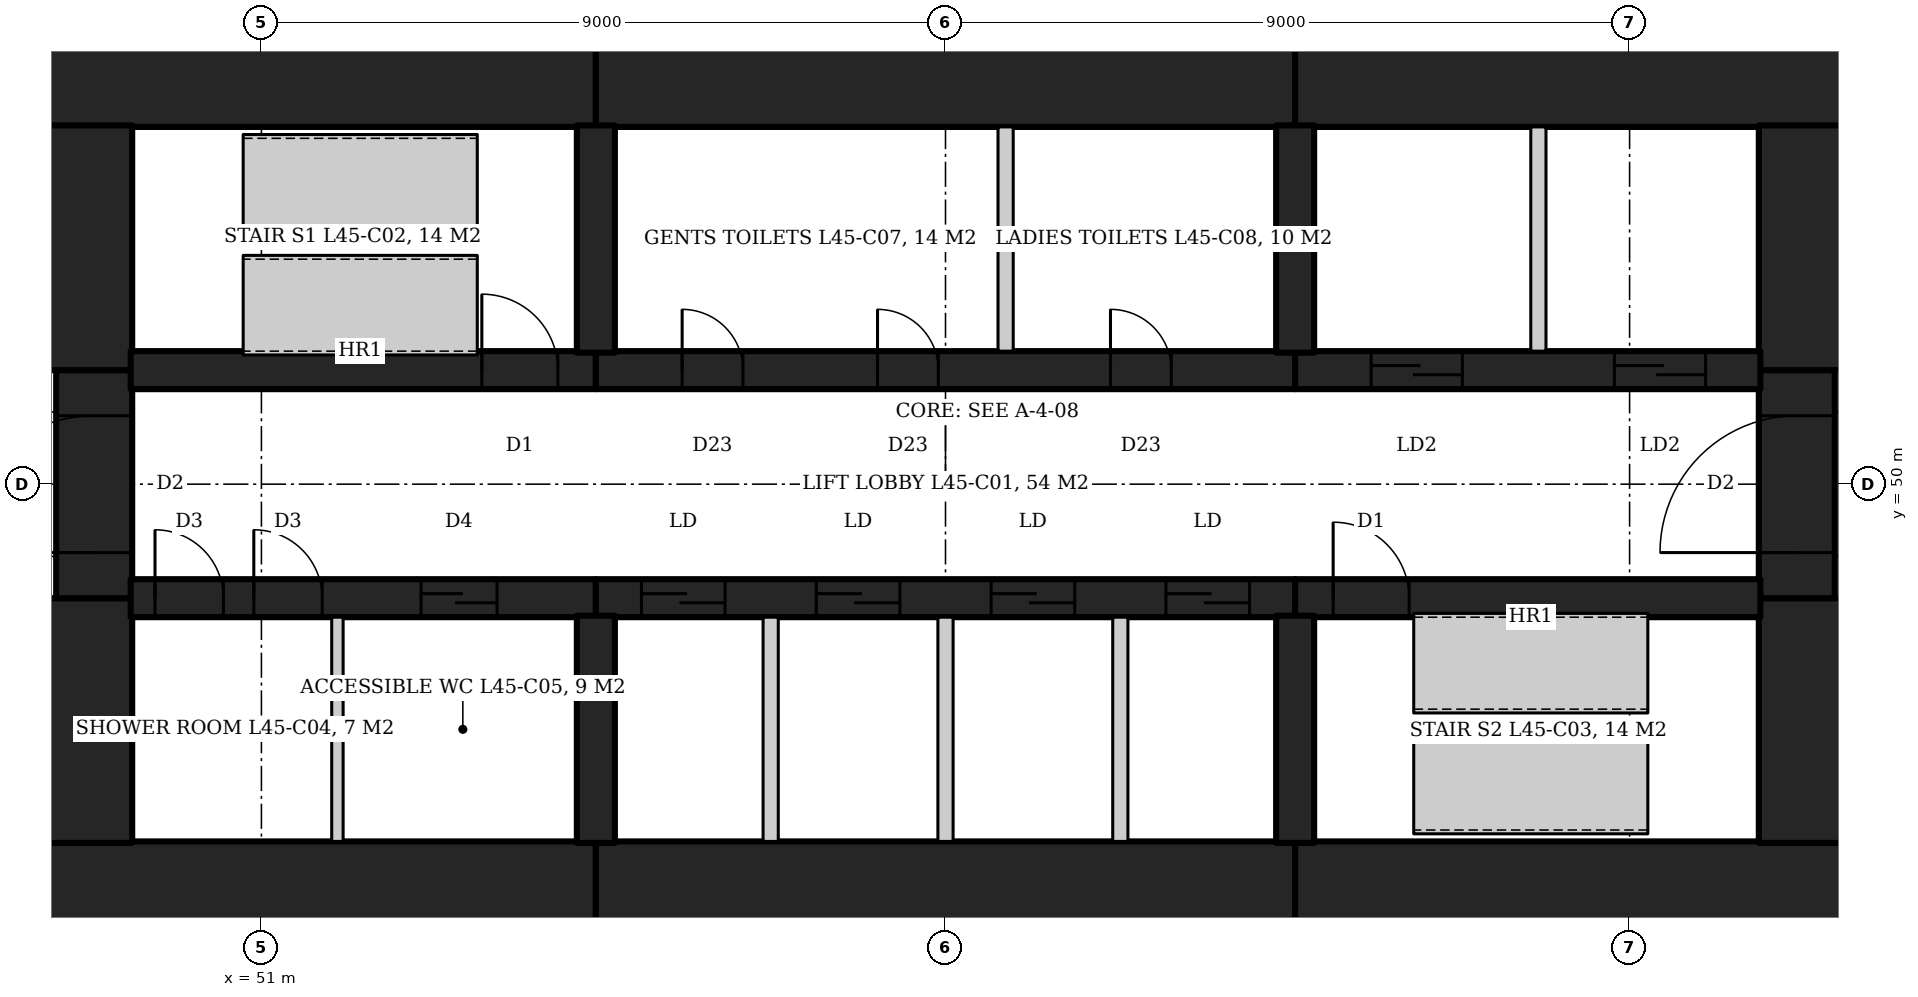
"""IFC4 building model, lengths in metres.
Left out: names, types, materials, properties, quantities, classifications, styles, units other than length and angle.
Written with IfcOpenShell. Run it as: python <this file> out.ifc"""

import sys

from ifc_helpers import new_model, si_unit, direction, frame, frame_2d, origin, place, context, subcontext, project, spatial, rectangle, extrude, element, fill, save


model = new_model("IFC4")
c1 = context("Model", 3, precision=1e-05, world=origin(), true_north=direction((0.0, 1.0)))
c2 = subcontext(c1, "Body", "Model", "MODEL_VIEW")
j1 = project(units=[si_unit("LENGTHUNIT", "METRE"), si_unit("PLANEANGLEUNIT", "RADIAN")], contexts=[c1])
p1 = place(None, origin())
s1 = spatial("IfcSite", under=j1, at=p1, CompositionType="ELEMENT")
p2 = place(p1, origin())
s2 = spatial("IfcBuilding", under=s1, at=p2, CompositionType="ELEMENT")
p3 = place(p2, frame((0.0, 0.0, 198.2)))
s3 = spatial("IfcBuildingStorey", under=s2, at=p3, CompositionType="ELEMENT", Elevation=198.2)
p4 = place(p3, frame((47.5, 55.45, 0.0), z_axis=(0.0, 0.0, 1.0), x_axis=(1.0, 0.0, 0.0)))
e1 = element("IfcWall", 1, at=p4, inside=s3, PredefinedType="SHEAR", context=c2, shape_type="SweptSolid", body=[
    extrude(rectangle(XDim=7.9, YDim=1.5, at=frame_2d((3.95, 0.0))), origin(), (0.0, 0.0, 1.0), 4.2),
])
p5 = place(p3, frame((55.4, 55.45, 0.0), z_axis=(0.0, 0.0, 1.0), x_axis=(1.0, 0.0, 0.0)))
e2 = element("IfcWall", 2, at=p5, inside=s3, PredefinedType="SHEAR", context=c2, shape_type="SweptSolid", body=[
    extrude(rectangle(XDim=9.2, YDim=1.5, at=frame_2d((4.6, 0.0))), origin(), (0.0, 0.0, 1.0), 4.2),
])
for number, where, z_axis, x_axis in (
    (3, (64.6, 55.45, 0.0), (0.0, 0.0, 1.0), (1.0, 0.0, 0.0)),
    (4, (47.5, 44.55, 0.0), (0.0, 0.0, 1.0), (1.0, 0.0, 0.0)),
):
    element("IfcWall", number, at=place(p3, frame(where, z_axis=z_axis, x_axis=x_axis)), inside=s3, PredefinedType="SHEAR", context=c2, shape_type="SweptSolid", body=[
        extrude(rectangle(XDim=7.9, YDim=1.5, at=frame_2d((3.95, 0.0))), origin(), (0.0, 0.0, 1.0), 4.2),
    ])
p6 = place(p3, frame((55.4, 44.55, 0.0), z_axis=(0.0, 0.0, 1.0), x_axis=(1.0, 0.0, 0.0)))
e5 = element("IfcWall", 5, at=p6, inside=s3, PredefinedType="SHEAR", context=c2, shape_type="SweptSolid", body=[
    extrude(rectangle(XDim=9.2, YDim=1.5, at=frame_2d((4.6, 0.0))), origin(), (0.0, 0.0, 1.0), 4.2),
])
p7 = place(p3, frame((64.6, 44.55, 0.0), z_axis=(0.0, 0.0, 1.0), x_axis=(1.0, 0.0, 0.0)))
e6 = element("IfcWall", 6, at=p7, inside=s3, PredefinedType="SHEAR", context=c2, shape_type="SweptSolid", body=[
    extrude(rectangle(XDim=7.9, YDim=1.5, at=frame_2d((3.95, 0.0))), origin(), (0.0, 0.0, 1.0), 4.2),
])
p8 = place(p3, frame((71.6, 45.28, 0.0), z_axis=(0.0, 0.0, 1.0), x_axis=(0.0, 1.0, 0.0)))
e7 = element("IfcWall", 7, at=p8, inside=s3, PredefinedType="SHEAR", context=c2, shape_type="SweptSolid", body=[
    extrude(rectangle(XDim=3.22, YDim=1.8, at=frame_2d((1.61, 0.0))), origin(), (0.0, 0.0, 1.0), 4.2),
])
p9 = place(p3, frame((71.2, 48.5, 0.0), z_axis=(0.0, 0.0, 1.0), x_axis=(0.0, 1.0, 0.0)))
e8 = element("IfcWall", 8, at=p9, inside=s3, PredefinedType="SHEAR", context=c2, shape_type="SweptSolid", body=[
    extrude(rectangle(XDim=3.0, YDim=1.0, at=frame_2d((1.5, 0.0))), origin(), (0.0, 0.0, 1.0), 4.2),
])
p10 = place(p9, frame((0.6, 0.0, 0.0)))
e9 = element("IfcOpeningElement", 9, at=p10, cuts=e8, PredefinedType="OPENING", context=c2, shape_type="SweptSolid", body=[
    extrude(rectangle(XDim=1.8, YDim=2.1, at=frame_2d((0.9, 1.05))), frame((0.0, 0.51, 0.0), z_axis=(0.0, -1.0, 0.0), x_axis=(1.0, 0.0, 0.0)), (0.0, 0.0, 1.0), 1.02),
])
for number, where, z_axis, x_axis in (
    (10, (71.6, 51.5, 0.0), (0.0, 0.0, 1.0), (0.0, 1.0, 0.0)),
    (11, (48.4, 45.28, 0.0), (0.0, 0.0, 1.0), (0.0, 1.0, 0.0)),
):
    element("IfcWall", number, at=place(p3, frame(where, z_axis=z_axis, x_axis=x_axis)), inside=s3, PredefinedType="SHEAR", context=c2, shape_type="SweptSolid", body=[
        extrude(rectangle(XDim=3.22, YDim=1.8, at=frame_2d((1.61, 0.0))), origin(), (0.0, 0.0, 1.0), 4.2),
    ])
p11 = place(p3, frame((48.8, 48.5, 0.0), z_axis=(0.0, 0.0, 1.0), x_axis=(0.0, 1.0, 0.0)))
e12 = element("IfcWall", 12, at=p11, inside=s3, PredefinedType="SHEAR", context=c2, shape_type="SweptSolid", body=[
    extrude(rectangle(XDim=3.0, YDim=1.0, at=frame_2d((1.5, 0.0))), origin(), (0.0, 0.0, 1.0), 4.2),
])
p12 = place(p11, frame((0.6, 0.0, 0.0)))
e13 = element("IfcOpeningElement", 13, at=p12, cuts=e12, PredefinedType="OPENING", context=c2, shape_type="SweptSolid", body=[
    extrude(rectangle(XDim=1.8, YDim=2.1, at=frame_2d((0.9, 1.05))), frame((0.0, 0.51, 0.0), z_axis=(0.0, -1.0, 0.0), x_axis=(1.0, 0.0, 0.0)), (0.0, 0.0, 1.0), 1.02),
])
p13 = place(p3, frame((48.4, 51.5, 0.0), z_axis=(0.0, 0.0, 1.0), x_axis=(0.0, 1.0, 0.0)))
e14 = element("IfcWall", 14, at=p13, inside=s3, PredefinedType="SHEAR", context=c2, shape_type="SweptSolid", body=[
    extrude(rectangle(XDim=3.22, YDim=1.8, at=frame_2d((1.61, 0.0))), origin(), (0.0, 0.0, 1.0), 4.2),
])
p14 = place(p3, frame((49.28, 51.5, 0.0), z_axis=(0.0, 0.0, 1.0), x_axis=(1.0, 0.0, 0.0)))
e15 = element("IfcWall", 15, at=p14, inside=s3, PredefinedType="SHEAR", context=c2, shape_type="SweptSolid", body=[
    extrude(rectangle(XDim=6.12, YDim=0.5, at=frame_2d((3.06, 0.0))), origin(), (0.0, 0.0, 1.0), 4.2),
])
p15 = place(p14, frame((4.62, 0.0, 0.0)))
e16 = element("IfcOpeningElement", 16, at=p15, cuts=e15, PredefinedType="OPENING", context=c2, shape_type="SweptSolid", body=[
    extrude(rectangle(XDim=1.0, YDim=2.1, at=frame_2d((0.5, 1.05))), frame((0.0, 0.26, 0.0), z_axis=(0.0, -1.0, 0.0), x_axis=(1.0, 0.0, 0.0)), (0.0, 0.0, 1.0), 0.52),
])
p16 = place(p3, frame((55.4, 51.5, 0.0), z_axis=(0.0, 0.0, 1.0), x_axis=(1.0, 0.0, 0.0)))
e17 = element("IfcWall", 17, at=p16, inside=s3, PredefinedType="SHEAR", context=c2, shape_type="SweptSolid", body=[
    extrude(rectangle(XDim=9.2, YDim=0.5, at=frame_2d((4.6, 0.0))), origin(), (0.0, 0.0, 1.0), 4.2),
])
p17 = place(p16, frame((1.135, 0.0, 0.0)))
e18 = element("IfcOpeningElement", 18, at=p17, cuts=e17, PredefinedType="OPENING", context=c2, shape_type="SweptSolid", body=[
    extrude(rectangle(XDim=0.8, YDim=2.1, at=frame_2d((0.4, 1.05))), frame((0.0, 0.26, 0.0), z_axis=(0.0, -1.0, 0.0), x_axis=(1.0, 0.0, 0.0)), (0.0, 0.0, 1.0), 0.52),
])
p18 = place(p16, frame((3.706, 0.0, 0.0)))
e19 = element("IfcOpeningElement", 19, at=p18, cuts=e17, PredefinedType="OPENING", context=c2, shape_type="SweptSolid", body=[
    extrude(rectangle(XDim=0.8, YDim=2.1, at=frame_2d((0.4, 1.05))), frame((0.0, 0.26, 0.0), z_axis=(0.0, -1.0, 0.0), x_axis=(1.0, 0.0, 0.0)), (0.0, 0.0, 1.0), 0.52),
])
p19 = place(p16, frame((6.771, 0.0, 0.0)))
e20 = element("IfcOpeningElement", 20, at=p19, cuts=e17, PredefinedType="OPENING", context=c2, shape_type="SweptSolid", body=[
    extrude(rectangle(XDim=0.8, YDim=2.1, at=frame_2d((0.4, 1.05))), frame((0.0, 0.26, 0.0), z_axis=(0.0, -1.0, 0.0), x_axis=(1.0, 0.0, 0.0)), (0.0, 0.0, 1.0), 0.52),
])
p20 = place(p3, frame((64.6, 51.5, 0.0), z_axis=(0.0, 0.0, 1.0), x_axis=(1.0, 0.0, 0.0)))
e21 = element("IfcWall", 21, at=p20, inside=s3, PredefinedType="SHEAR", context=c2, shape_type="SweptSolid", body=[
    extrude(rectangle(XDim=6.12, YDim=0.5, at=frame_2d((3.06, 0.0))), origin(), (0.0, 0.0, 1.0), 4.2),
])
p21 = place(p20, frame((1.0, 0.0, 0.0)))
e22 = element("IfcOpeningElement", 22, at=p21, cuts=e21, PredefinedType="OPENING", context=c2, shape_type="SweptSolid", body=[
    extrude(rectangle(XDim=1.2, YDim=2.1, at=frame_2d((0.6, 1.05))), frame((0.0, 0.26, 0.0), z_axis=(0.0, -1.0, 0.0), x_axis=(1.0, 0.0, 0.0)), (0.0, 0.0, 1.0), 0.52),
])
p22 = place(p20, frame((4.2, 0.0, 0.0)))
e23 = element("IfcOpeningElement", 23, at=p22, cuts=e21, PredefinedType="OPENING", context=c2, shape_type="SweptSolid", body=[
    extrude(rectangle(XDim=1.2, YDim=2.1, at=frame_2d((0.6, 1.05))), frame((0.0, 0.26, 0.0), z_axis=(0.0, -1.0, 0.0), x_axis=(1.0, 0.0, 0.0)), (0.0, 0.0, 1.0), 0.52),
])
p23 = place(p3, frame((49.28, 48.5, 0.0), z_axis=(0.0, 0.0, 1.0), x_axis=(1.0, 0.0, 0.0)))
e24 = element("IfcWall", 24, at=p23, inside=s3, PredefinedType="SHEAR", context=c2, shape_type="SweptSolid", body=[
    extrude(rectangle(XDim=6.12, YDim=0.5, at=frame_2d((3.06, 0.0))), origin(), (0.0, 0.0, 1.0), 4.2),
])
p24 = place(p23, frame((0.32, 0.0, 0.0)))
e25 = element("IfcOpeningElement", 25, at=p24, cuts=e24, PredefinedType="OPENING", context=c2, shape_type="SweptSolid", body=[
    extrude(rectangle(XDim=0.9, YDim=2.1, at=frame_2d((0.45, 1.05))), frame((0.0, 0.26, 0.0), z_axis=(0.0, -1.0, 0.0), x_axis=(1.0, 0.0, 0.0)), (0.0, 0.0, 1.0), 0.52),
])
p25 = place(p23, frame((1.62, 0.0, 0.0)))
e26 = element("IfcOpeningElement", 26, at=p25, cuts=e24, PredefinedType="OPENING", context=c2, shape_type="SweptSolid", body=[
    extrude(rectangle(XDim=0.9, YDim=2.1, at=frame_2d((0.45, 1.05))), frame((0.0, 0.26, 0.0), z_axis=(0.0, -1.0, 0.0), x_axis=(1.0, 0.0, 0.0)), (0.0, 0.0, 1.0), 0.52),
])
p26 = place(p23, frame((3.82, 0.0, 0.0)))
e27 = element("IfcOpeningElement", 27, at=p26, cuts=e24, PredefinedType="OPENING", context=c2, shape_type="SweptSolid", body=[
    extrude(rectangle(XDim=1.0, YDim=2.1, at=frame_2d((0.5, 1.05))), frame((0.0, 0.26, 0.0), z_axis=(0.0, -1.0, 0.0), x_axis=(1.0, 0.0, 0.0)), (0.0, 0.0, 1.0), 0.52),
])
p27 = place(p3, frame((55.4, 48.5, 0.0), z_axis=(0.0, 0.0, 1.0), x_axis=(1.0, 0.0, 0.0)))
e28 = element("IfcWall", 28, at=p27, inside=s3, PredefinedType="SHEAR", context=c2, shape_type="SweptSolid", body=[
    extrude(rectangle(XDim=9.2, YDim=0.5, at=frame_2d((4.6, 0.0))), origin(), (0.0, 0.0, 1.0), 4.2),
])
p28 = place(p27, frame((0.6, 0.0, 0.0)))
e29 = element("IfcOpeningElement", 29, at=p28, cuts=e28, PredefinedType="OPENING", context=c2, shape_type="SweptSolid", body=[
    extrude(rectangle(XDim=1.1, YDim=2.1, at=frame_2d((0.55, 1.05))), frame((0.0, 0.26, 0.0), z_axis=(0.0, -1.0, 0.0), x_axis=(1.0, 0.0, 0.0)), (0.0, 0.0, 1.0), 0.52),
])
p29 = place(p27, frame((2.9, 0.0, 0.0)))
e30 = element("IfcOpeningElement", 30, at=p29, cuts=e28, PredefinedType="OPENING", context=c2, shape_type="SweptSolid", body=[
    extrude(rectangle(XDim=1.1, YDim=2.1, at=frame_2d((0.55, 1.05))), frame((0.0, 0.26, 0.0), z_axis=(0.0, -1.0, 0.0), x_axis=(1.0, 0.0, 0.0)), (0.0, 0.0, 1.0), 0.52),
])
p30 = place(p27, frame((5.2, 0.0, 0.0)))
e31 = element("IfcOpeningElement", 31, at=p30, cuts=e28, PredefinedType="OPENING", context=c2, shape_type="SweptSolid", body=[
    extrude(rectangle(XDim=1.1, YDim=2.1, at=frame_2d((0.55, 1.05))), frame((0.0, 0.26, 0.0), z_axis=(0.0, -1.0, 0.0), x_axis=(1.0, 0.0, 0.0)), (0.0, 0.0, 1.0), 0.52),
])
p31 = place(p27, frame((7.5, 0.0, 0.0)))
e32 = element("IfcOpeningElement", 32, at=p31, cuts=e28, PredefinedType="OPENING", context=c2, shape_type="SweptSolid", body=[
    extrude(rectangle(XDim=1.1, YDim=2.1, at=frame_2d((0.55, 1.05))), frame((0.0, 0.26, 0.0), z_axis=(0.0, -1.0, 0.0), x_axis=(1.0, 0.0, 0.0)), (0.0, 0.0, 1.0), 0.52),
])
p32 = place(p3, frame((64.6, 48.5, 0.0), z_axis=(0.0, 0.0, 1.0), x_axis=(1.0, 0.0, 0.0)))
e33 = element("IfcWall", 33, at=p32, inside=s3, PredefinedType="SHEAR", context=c2, shape_type="SweptSolid", body=[
    extrude(rectangle(XDim=6.12, YDim=0.5, at=frame_2d((3.06, 0.0))), origin(), (0.0, 0.0, 1.0), 4.2),
])
p33 = place(p32, frame((0.5, 0.0, 0.0)))
e34 = element("IfcOpeningElement", 34, at=p33, cuts=e33, PredefinedType="OPENING", context=c2, shape_type="SweptSolid", body=[
    extrude(rectangle(XDim=1.0, YDim=2.1, at=frame_2d((0.5, 1.05))), frame((0.0, 0.26, 0.0), z_axis=(0.0, -1.0, 0.0), x_axis=(1.0, 0.0, 0.0)), (0.0, 0.0, 1.0), 0.52),
])
for number, where, z_axis, x_axis in (
    (35, (55.4, 51.73, 0.0), (0.0, 0.0, 1.0), (0.0, 1.0, 0.0)),
    (36, (64.6, 51.73, 0.0), (0.0, 0.0, 1.0), (0.0, 1.0, 0.0)),
    (37, (55.4, 48.27, 0.0), (0.0, 0.0, 1.0), (0.0, -1.0, 0.0)),
    (38, (64.6, 48.27, 0.0), (0.0, 0.0, 1.0), (0.0, -1.0, 0.0)),
):
    element("IfcWall", number, at=place(p3, frame(where, z_axis=z_axis, x_axis=x_axis)), inside=s3, PredefinedType="SHEAR", context=c2, shape_type="SweptSolid", body=[
        extrude(rectangle(XDim=2.99, YDim=0.5, at=frame_2d((1.495, 0.0))), origin(), (0.0, 0.0, 1.0), 4.2),
    ])
for number, where, z_axis, x_axis in (
    (39, (57.7, 45.3, 0.0), (0.0, 0.0, 1.0), (0.0, 1.0, 0.0)),
    (40, (60.0, 45.3, 0.0), (0.0, 0.0, 1.0), (0.0, 1.0, 0.0)),
    (41, (62.3, 45.3, 0.0), (0.0, 0.0, 1.0), (0.0, 1.0, 0.0)),
    (42, (67.8, 51.75, 0.0), (0.0, 0.0, 1.0), (0.0, 1.0, 0.0)),
):
    element("IfcWall", number, at=place(p3, frame(where, z_axis=z_axis, x_axis=x_axis)), inside=s3, PredefinedType="PARTITIONING", context=c2, shape_type="SweptSolid", body=[
        extrude(rectangle(XDim=2.95, YDim=0.2, at=frame_2d((1.475, 0.0))), origin(), (0.0, 0.0, 1.0), 4.2),
    ])
p34 = place(p3, frame((52.0, 45.3, 0.0), z_axis=(0.0, 0.0, 1.0), x_axis=(0.0, 1.0, 0.0)))
e43 = element("IfcWall", 43, at=p34, inside=s3, PredefinedType="PARTITIONING", context=c2, shape_type="SweptSolid", body=[
    extrude(rectangle(XDim=2.95, YDim=0.15, at=frame_2d((1.475, 0.0))), origin(), (0.0, 0.0, 1.0), 4.04),
])
p35 = place(p3, frame((60.791, 51.75, 0.0), z_axis=(0.0, 0.0, 1.0), x_axis=(0.0, 1.0, 0.0)))
e44 = element("IfcWall", 44, at=p35, inside=s3, PredefinedType="PARTITIONING", context=c2, shape_type="SweptSolid", body=[
    extrude(rectangle(XDim=2.95, YDim=0.2, at=frame_2d((1.475, 0.0))), origin(), (0.0, 0.0, 1.0), 4.04),
])
p36 = place(p15, origin())
e45 = element("IfcDoor", 45, at=p36, inside=s3, OperationType="SINGLE_SWING_LEFT", PredefinedType="DOOR", context=c2, shape_type="SweptSolid", body=[
    extrude(rectangle(XDim=1.0, YDim=2.1, at=frame_2d((0.5, 1.05))), frame((0.0, 0.025, 0.0), z_axis=(0.0, -1.0, 0.0), x_axis=(1.0, 0.0, 0.0)), (0.0, 0.0, 1.0), 0.05),
])
fill(e16, e45)
p37 = place(p33, origin())
e46 = element("IfcDoor", 46, at=p37, inside=s3, OperationType="SINGLE_SWING_LEFT", PredefinedType="DOOR", context=c2, shape_type="SweptSolid", body=[
    extrude(rectangle(XDim=1.0, YDim=2.1, at=frame_2d((0.5, 1.05))), frame((0.0, 0.025, 0.0), z_axis=(0.0, -1.0, 0.0), x_axis=(1.0, 0.0, 0.0)), (0.0, 0.0, 1.0), 0.05),
])
fill(e34, e46)
p38 = place(p21, origin())
e47 = element("IfcDoor", 47, at=p38, inside=s3, OperationType="SLIDING_TO_LEFT", PredefinedType="DOOR", context=c2, shape_type="SweptSolid", body=[
    extrude(rectangle(XDim=1.2, YDim=2.1, at=frame_2d((0.6, 1.05))), frame((0.0, 0.025, 0.0), z_axis=(0.0, -1.0, 0.0), x_axis=(1.0, 0.0, 0.0)), (0.0, 0.0, 1.0), 0.05),
])
fill(e22, e47)
p39 = place(p22, origin())
e48 = element("IfcDoor", 48, at=p39, inside=s3, OperationType="SLIDING_TO_LEFT", PredefinedType="DOOR", context=c2, shape_type="SweptSolid", body=[
    extrude(rectangle(XDim=1.2, YDim=2.1, at=frame_2d((0.6, 1.05))), frame((0.0, 0.025, 0.0), z_axis=(0.0, -1.0, 0.0), x_axis=(1.0, 0.0, 0.0)), (0.0, 0.0, 1.0), 0.05),
])
fill(e23, e48)
p40 = place(p28, origin())
e49 = element("IfcDoor", 49, at=p40, inside=s3, OperationType="SLIDING_TO_LEFT", PredefinedType="DOOR", context=c2, shape_type="SweptSolid", body=[
    extrude(rectangle(XDim=1.1, YDim=2.1, at=frame_2d((0.55, 1.05))), frame((0.0, 0.025, 0.0), z_axis=(0.0, -1.0, 0.0), x_axis=(1.0, 0.0, 0.0)), (0.0, 0.0, 1.0), 0.05),
])
fill(e29, e49)
p41 = place(p29, origin())
e50 = element("IfcDoor", 50, at=p41, inside=s3, OperationType="SLIDING_TO_LEFT", PredefinedType="DOOR", context=c2, shape_type="SweptSolid", body=[
    extrude(rectangle(XDim=1.1, YDim=2.1, at=frame_2d((0.55, 1.05))), frame((0.0, 0.025, 0.0), z_axis=(0.0, -1.0, 0.0), x_axis=(1.0, 0.0, 0.0)), (0.0, 0.0, 1.0), 0.05),
])
fill(e30, e50)
p42 = place(p30, origin())
e51 = element("IfcDoor", 51, at=p42, inside=s3, OperationType="SLIDING_TO_LEFT", PredefinedType="DOOR", context=c2, shape_type="SweptSolid", body=[
    extrude(rectangle(XDim=1.1, YDim=2.1, at=frame_2d((0.55, 1.05))), frame((0.0, 0.025, 0.0), z_axis=(0.0, -1.0, 0.0), x_axis=(1.0, 0.0, 0.0)), (0.0, 0.0, 1.0), 0.05),
])
fill(e31, e51)
p43 = place(p31, origin())
e52 = element("IfcDoor", 52, at=p43, inside=s3, OperationType="SLIDING_TO_LEFT", PredefinedType="DOOR", context=c2, shape_type="SweptSolid", body=[
    extrude(rectangle(XDim=1.1, YDim=2.1, at=frame_2d((0.55, 1.05))), frame((0.0, 0.025, 0.0), z_axis=(0.0, -1.0, 0.0), x_axis=(1.0, 0.0, 0.0)), (0.0, 0.0, 1.0), 0.05),
])
fill(e32, e52)
p44 = place(p24, origin())
e53 = element("IfcDoor", 53, at=p44, inside=s3, OperationType="SINGLE_SWING_RIGHT", PredefinedType="DOOR", context=c2, shape_type="SweptSolid", body=[
    extrude(rectangle(XDim=0.9, YDim=2.1, at=frame_2d((0.45, 1.05))), frame((0.0, 0.025, 0.0), z_axis=(0.0, -1.0, 0.0), x_axis=(1.0, 0.0, 0.0)), (0.0, 0.0, 1.0), 0.05),
])
fill(e25, e53)
p45 = place(p25, origin())
e54 = element("IfcDoor", 54, at=p45, inside=s3, OperationType="SINGLE_SWING_RIGHT", PredefinedType="DOOR", context=c2, shape_type="SweptSolid", body=[
    extrude(rectangle(XDim=0.9, YDim=2.1, at=frame_2d((0.45, 1.05))), frame((0.0, 0.025, 0.0), z_axis=(0.0, -1.0, 0.0), x_axis=(1.0, 0.0, 0.0)), (0.0, 0.0, 1.0), 0.05),
])
fill(e26, e54)
p46 = place(p26, origin())
e55 = element("IfcDoor", 55, at=p46, inside=s3, OperationType="SLIDING_TO_LEFT", PredefinedType="DOOR", context=c2, shape_type="SweptSolid", body=[
    extrude(rectangle(XDim=1.0, YDim=2.1, at=frame_2d((0.5, 1.05))), frame((0.0, 0.025, 0.0), z_axis=(0.0, -1.0, 0.0), x_axis=(1.0, 0.0, 0.0)), (0.0, 0.0, 1.0), 0.05),
])
fill(e27, e55)
p47 = place(p10, origin())
e56 = element("IfcDoor", 56, at=p47, inside=s3, OperationType="DOUBLE_DOOR_DOUBLE_SWING", PredefinedType="DOOR", context=c2, shape_type="SweptSolid", body=[
    extrude(rectangle(XDim=1.8, YDim=2.1, at=frame_2d((0.9, 1.05))), frame((0.0, 0.025, 0.0), z_axis=(0.0, -1.0, 0.0), x_axis=(1.0, 0.0, 0.0)), (0.0, 0.0, 1.0), 0.05),
])
fill(e9, e56)
p48 = place(p12, origin())
e57 = element("IfcDoor", 57, at=p48, inside=s3, OperationType="DOUBLE_DOOR_DOUBLE_SWING", PredefinedType="DOOR", context=c2, shape_type="SweptSolid", body=[
    extrude(rectangle(XDim=1.8, YDim=2.1, at=frame_2d((0.9, 1.05))), frame((0.0, 0.025, 0.0), z_axis=(0.0, -1.0, 0.0), x_axis=(1.0, 0.0, 0.0)), (0.0, 0.0, 1.0), 0.05),
])
fill(e13, e57)
p49 = place(p17, origin())
e58 = element("IfcDoor", 58, at=p49, inside=s3, OperationType="SINGLE_SWING_LEFT", PredefinedType="DOOR", context=c2, shape_type="SweptSolid", body=[
    extrude(rectangle(XDim=0.8, YDim=2.1, at=frame_2d((0.4, 1.05))), frame((0.0, 0.025, 0.0), z_axis=(0.0, -1.0, 0.0), x_axis=(1.0, 0.0, 0.0)), (0.0, 0.0, 1.0), 0.05),
])
fill(e18, e58)
p50 = place(p18, origin())
e59 = element("IfcDoor", 59, at=p50, inside=s3, OperationType="SINGLE_SWING_LEFT", PredefinedType="DOOR", context=c2, shape_type="SweptSolid", body=[
    extrude(rectangle(XDim=0.8, YDim=2.1, at=frame_2d((0.4, 1.05))), frame((0.0, 0.025, 0.0), z_axis=(0.0, -1.0, 0.0), x_axis=(1.0, 0.0, 0.0)), (0.0, 0.0, 1.0), 0.05),
])
fill(e19, e59)
p51 = place(p19, origin())
e60 = element("IfcDoor", 60, at=p51, inside=s3, OperationType="SINGLE_SWING_LEFT", PredefinedType="DOOR", context=c2, shape_type="SweptSolid", body=[
    extrude(rectangle(XDim=0.8, YDim=2.1, at=frame_2d((0.4, 1.05))), frame((0.0, 0.025, 0.0), z_axis=(0.0, -1.0, 0.0), x_axis=(1.0, 0.0, 0.0)), (0.0, 0.0, 1.0), 0.05),
])
fill(e20, e60)
save(model, sys.argv[1])
